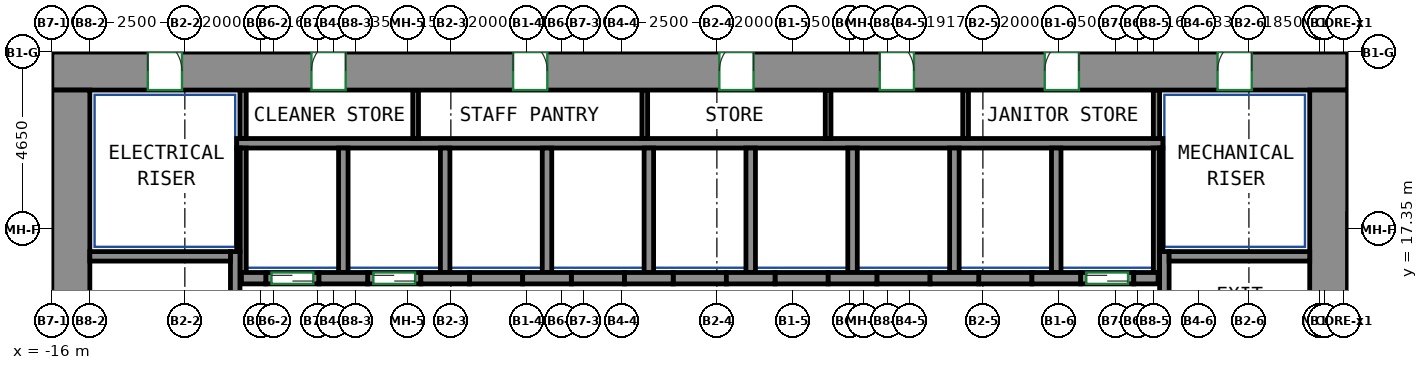
"""IFC4 building model, lengths in metres.
Left out: names, types, materials, properties, quantities, classifications, styles, units other than length and angle.
Written with IfcOpenShell. Run it as: python <this file> out.ifc"""

import sys

from ifc_helpers import new_model, si_unit, direction, frame, frame_2d, origin, place, context, subcontext, project, spatial, rectangle, extrude, source, transform, mapped, element, fill, save


model = new_model("IFC4")
c1 = context("Model", 3, precision=1e-05, world=origin(), true_north=direction((0.0, 1.0)))
c2 = subcontext(c1, "Body", "Model", "MODEL_VIEW")
j1 = project(units=[si_unit("LENGTHUNIT", "METRE"), si_unit("PLANEANGLEUNIT", "RADIAN")], contexts=[c1])
p1 = place(None, origin())
s1 = spatial("IfcSite", under=j1, at=p1, CompositionType="ELEMENT")
p2 = place(p1, origin())
s2 = spatial("IfcBuilding", under=s1, at=p2, CompositionType="ELEMENT")
p3 = place(p2, frame((0.0, 0.0, 83.2)))
s3 = spatial("IfcBuildingStorey", under=s2, at=p3, CompositionType="ELEMENT", Elevation=83.2)
m1 = source(origin(), c2, "Body", "SweptSolid", [
    extrude(rectangle(XDim=34.1, YDim=1.0, at=frame_2d((17.05, 0.0))), origin(), (0.0, 0.0, 1.0), 3.72),
])
p4 = place(p3, frame((-16.0, 21.5, 0.0), z_axis=(0.0, 0.0, 1.0), x_axis=(1.0, 0.0, 0.0)))
e1 = element("IfcWall", 1, at=p4, inside=s3, PredefinedType="SHEAR", context=c2, shape_type="MappedRepresentation", body=[
    mapped(m1, transform((0.0, 0.0, 0.0))),
])
p5 = place(p4, frame((6.831, 0.0, 0.0)))
e2 = element("IfcOpeningElement", 2, at=p5, cuts=e1, PredefinedType="OPENING", context=c2, shape_type="SweptSolid", body=[
    extrude(rectangle(XDim=0.9, YDim=2.1, at=frame_2d((0.45, 1.05))), frame((0.0, 0.51, 0.0), z_axis=(0.0, -1.0, 0.0), x_axis=(1.0, 0.0, 0.0)), (0.0, 0.0, 1.0), 1.02),
])
p6 = place(p4, frame((12.138, 0.0, 0.0)))
e3 = element("IfcOpeningElement", 3, at=p6, cuts=e1, PredefinedType="OPENING", context=c2, shape_type="SweptSolid", body=[
    extrude(rectangle(XDim=0.9, YDim=2.1, at=frame_2d((0.45, 1.05))), frame((0.0, 0.51, 0.0), z_axis=(0.0, -1.0, 0.0), x_axis=(1.0, 0.0, 0.0)), (0.0, 0.0, 1.0), 1.02),
])
p7 = place(p4, frame((17.565, 0.0, 0.0)))
e4 = element("IfcOpeningElement", 4, at=p7, cuts=e1, PredefinedType="OPENING", context=c2, shape_type="SweptSolid", body=[
    extrude(rectangle(XDim=0.9, YDim=2.1, at=frame_2d((0.45, 1.05))), frame((0.0, 0.51, 0.0), z_axis=(0.0, -1.0, 0.0), x_axis=(1.0, 0.0, 0.0)), (0.0, 0.0, 1.0), 1.02),
])
p8 = place(p4, frame((21.786, 0.0, 0.0)))
e5 = element("IfcOpeningElement", 5, at=p8, cuts=e1, PredefinedType="OPENING", context=c2, shape_type="SweptSolid", body=[
    extrude(rectangle(XDim=0.9, YDim=2.1, at=frame_2d((0.45, 1.05))), frame((0.0, 0.51, 0.0), z_axis=(0.0, -1.0, 0.0), x_axis=(1.0, 0.0, 0.0)), (0.0, 0.0, 1.0), 1.02),
])
p9 = place(p4, frame((26.127, 0.0, 0.0)))
e6 = element("IfcOpeningElement", 6, at=p9, cuts=e1, PredefinedType="OPENING", context=c2, shape_type="SweptSolid", body=[
    extrude(rectangle(XDim=0.9, YDim=2.1, at=frame_2d((0.45, 1.05))), frame((0.0, 0.51, 0.0), z_axis=(0.0, -1.0, 0.0), x_axis=(1.0, 0.0, 0.0)), (0.0, 0.0, 1.0), 1.02),
])
p10 = place(p4, frame((2.525, 0.0, 0.0)))
e7 = element("IfcOpeningElement", 7, at=p10, cuts=e1, PredefinedType="OPENING", context=c2, shape_type="SweptSolid", body=[
    extrude(rectangle(XDim=0.9, YDim=2.1, at=frame_2d((0.45, 1.05))), frame((0.0, 0.51, 0.0), z_axis=(0.0, -1.0, 0.0), x_axis=(1.0, 0.0, 0.0)), (0.0, 0.0, 1.0), 1.02),
])
p11 = place(p4, frame((30.675, 0.0, 0.0)))
e8 = element("IfcOpeningElement", 8, at=p11, cuts=e1, PredefinedType="OPENING", context=c2, shape_type="SweptSolid", body=[
    extrude(rectangle(XDim=0.9, YDim=2.1, at=frame_2d((0.45, 1.05))), frame((0.0, 0.51, 0.0), z_axis=(0.0, -1.0, 0.0), x_axis=(1.0, 0.0, 0.0)), (0.0, 0.0, 1.0), 1.02),
])
m2 = source(origin(), c2, "Body", "SweptSolid", [
    extrude(rectangle(XDim=12.0, YDim=1.0, at=frame_2d((6.0, 0.0))), origin(), (0.0, 0.0, 1.0), 3.72),
])
for number, where, z_axis, x_axis in (
    (9, (-15.5, 9.0, 0.0), (0.0, 0.0, 1.0), (0.0, 1.0, 0.0)),
    (10, (17.6, 9.0, 0.0), (0.0, 0.0, 1.0), (0.0, 1.0, 0.0)),
):
    element("IfcWall", number, at=place(p3, frame(where, z_axis=z_axis, x_axis=x_axis)), inside=s3, PredefinedType="SHEAR", context=c2, shape_type="MappedRepresentation", body=[
        mapped(m2, transform((0.0, 0.0, 0.0))),
    ])
m3 = source(origin(), c2, "Body", "SweptSolid", [
    extrude(rectangle(XDim=7.75, YDim=0.25, at=frame_2d((3.875, 0.0))), origin(), (0.0, 0.0, 1.0), 3.72),
])
p12 = place(p3, frame((-11.175, 9.0, 0.0), z_axis=(0.0, 0.0, 1.0), x_axis=(0.0, 1.0, 0.0)))
e11 = element("IfcWall", 11, at=p12, inside=s3, PredefinedType="SHEAR", context=c2, shape_type="MappedRepresentation", body=[
    mapped(m3, transform((0.0, 0.0, 0.0))),
])
m4 = source(origin(), c2, "Body", "SweptSolid", [
    extrude(rectangle(XDim=3.7, YDim=0.25, at=frame_2d((1.85, 0.0))), origin(), (0.0, 0.0, 1.0), 3.72),
])
p13 = place(p3, frame((-15.0, 16.625, 0.0), z_axis=(0.0, 0.0, 1.0), x_axis=(1.0, 0.0, 0.0)))
e12 = element("IfcWall", 12, at=p13, inside=s3, PredefinedType="SHEAR", context=c2, shape_type="MappedRepresentation", body=[
    mapped(m4, transform((0.0, 0.0, 0.0))),
])
p14 = place(p3, frame((13.275, 9.0, 0.0), z_axis=(0.0, 0.0, 1.0), x_axis=(0.0, 1.0, 0.0)))
e13 = element("IfcWall", 13, at=p14, inside=s3, PredefinedType="SHEAR", context=c2, shape_type="MappedRepresentation", body=[
    mapped(m3, transform((0.0, 0.0, 0.0))),
])
m5 = source(origin(), c2, "Body", "SweptSolid", [
    extrude(rectangle(XDim=3.7, YDim=0.25, at=frame_2d((1.85, 0.0))), origin(), (0.0, 0.0, 1.0), 3.72),
])
p15 = place(p3, frame((13.4, 16.625, 0.0), z_axis=(0.0, 0.0, 1.0), x_axis=(1.0, 0.0, 0.0)))
e14 = element("IfcWall", 14, at=p15, inside=s3, PredefinedType="SHEAR", context=c2, shape_type="MappedRepresentation", body=[
    mapped(m5, transform((0.0, 0.0, 0.0))),
])
m6 = source(origin(), c2, "Body", "SweptSolid", [
    extrude(rectangle(XDim=0.64, YDim=0.3, at=frame_2d((0.32, 0.0))), origin(), (0.0, 0.0, 1.0), 3.72),
])
p16 = place(p3, frame((-11.01, 16.05, 0.0), z_axis=(0.0, 0.0, 1.0), x_axis=(1.0, 0.0, 0.0)))
e15 = element("IfcWall", 15, at=p16, inside=s3, PredefinedType="SHEAR", context=c2, shape_type="MappedRepresentation", body=[
    mapped(m6, transform((0.0, 0.0, 0.0))),
])
m7 = source(origin(), c2, "Body", "SweptSolid", [
    extrude(rectangle(XDim=1.28, YDim=0.3, at=frame_2d((0.64, 0.0))), origin(), (0.0, 0.0, 1.0), 3.72),
])
for number, where, z_axis, x_axis in (
    (16, (-8.97, 16.05, 0.0), (0.0, 0.0, 1.0), (1.0, 0.0, 0.0)),
    (17, (-6.29, 16.05, 0.0), (0.0, 0.0, 1.0), (1.0, 0.0, 0.0)),
    (18, (-3.61, 16.05, 0.0), (0.0, 0.0, 1.0), (1.0, 0.0, 0.0)),
    (19, (-0.93, 16.05, 0.0), (0.0, 0.0, 1.0), (1.0, 0.0, 0.0)),
    (20, (1.75, 16.05, 0.0), (0.0, 0.0, 1.0), (1.0, 0.0, 0.0)),
    (21, (4.43, 16.05, 0.0), (0.0, 0.0, 1.0), (1.0, 0.0, 0.0)),
):
    element("IfcWall", number, at=place(p3, frame(where, z_axis=z_axis, x_axis=x_axis)), inside=s3, PredefinedType="SHEAR", context=c2, shape_type="MappedRepresentation", body=[
        mapped(m7, transform((0.0, 0.0, 0.0))),
    ])
m8 = source(origin(), c2, "Body", "SweptSolid", [
    extrude(rectangle(XDim=1.28, YDim=0.3, at=frame_2d((0.64, 0.0))), origin(), (0.0, 0.0, 1.0), 3.72),
])
p17 = place(p3, frame((7.11, 16.05, 0.0), z_axis=(0.0, 0.0, 1.0), x_axis=(1.0, 0.0, 0.0)))
e22 = element("IfcWall", 22, at=p17, inside=s3, PredefinedType="SHEAR", context=c2, shape_type="MappedRepresentation", body=[
    mapped(m8, transform((0.0, 0.0, 0.0))),
])
p18 = place(p3, frame((9.79, 16.05, 0.0), z_axis=(0.0, 0.0, 1.0), x_axis=(1.0, 0.0, 0.0)))
e23 = element("IfcWall", 23, at=p18, inside=s3, PredefinedType="SHEAR", context=c2, shape_type="MappedRepresentation", body=[
    mapped(m7, transform((0.0, 0.0, 0.0))),
])
m9 = source(origin(), c2, "Body", "SweptSolid", [
    extrude(rectangle(XDim=0.64, YDim=0.3, at=frame_2d((0.32, 0.0))), origin(), (0.0, 0.0, 1.0), 3.72),
])
p19 = place(p3, frame((12.47, 16.05, 0.0), z_axis=(0.0, 0.0, 1.0), x_axis=(1.0, 0.0, 0.0)))
e24 = element("IfcWall", 24, at=p19, inside=s3, PredefinedType="SHEAR", context=c2, shape_type="MappedRepresentation", body=[
    mapped(m9, transform((0.0, 0.0, 0.0))),
])
m10 = source(origin(), c2, "Body", "SweptSolid", [
    extrude(rectangle(XDim=1.4, YDim=0.3, at=frame_2d((0.7, 0.0))), origin(), (0.0, 0.0, 1.0), 3.72),
])
p20 = place(p3, frame((11.07, 16.05, 0.0), z_axis=(0.0, 0.0, 1.0), x_axis=(1.0, 0.0, 0.0)))
e25 = element("IfcWall", 25, at=p20, inside=s3, PredefinedType="PARTITIONING", context=c2, shape_type="MappedRepresentation", body=[
    mapped(m10, transform((0.0, 0.0, 0.0))),
])
p21 = place(p20, frame((0.15, 0.0, 0.0)))
e26 = element("IfcOpeningElement", 26, at=p21, cuts=e25, PredefinedType="OPENING", context=c2, shape_type="SweptSolid", body=[
    extrude(rectangle(XDim=1.1, YDim=2.1, at=frame_2d((0.55, 1.05))), frame((0.0, 0.16, 0.0), z_axis=(0.0, -1.0, 0.0), x_axis=(1.0, 0.0, 0.0)), (0.0, 0.0, 1.0), 0.32),
])
m11 = source(origin(), c2, "Body", "SweptSolid", [
    extrude(rectangle(XDim=1.4, YDim=0.3, at=frame_2d((0.7, 0.0))), origin(), (0.0, 0.0, 1.0), 3.72),
])
p22 = place(p3, frame((-10.37, 16.05, 0.0), z_axis=(0.0, 0.0, 1.0), x_axis=(1.0, 0.0, 0.0)))
e27 = element("IfcWall", 27, at=p22, inside=s3, PredefinedType="PARTITIONING", context=c2, shape_type="MappedRepresentation", body=[
    mapped(m11, transform((0.0, 0.0, 0.0))),
])
p23 = place(p22, frame((0.15, 0.0, 0.0)))
e28 = element("IfcOpeningElement", 28, at=p23, cuts=e27, PredefinedType="OPENING", context=c2, shape_type="SweptSolid", body=[
    extrude(rectangle(XDim=1.1, YDim=2.1, at=frame_2d((0.55, 1.05))), frame((0.0, 0.16, 0.0), z_axis=(0.0, -1.0, 0.0), x_axis=(1.0, 0.0, 0.0)), (0.0, 0.0, 1.0), 0.32),
])
p24 = place(p3, frame((-7.69, 16.05, 0.0), z_axis=(0.0, 0.0, 1.0), x_axis=(1.0, 0.0, 0.0)))
e29 = element("IfcWall", 29, at=p24, inside=s3, PredefinedType="PARTITIONING", context=c2, shape_type="MappedRepresentation", body=[
    mapped(m10, transform((0.0, 0.0, 0.0))),
])
p25 = place(p24, frame((0.15, 0.0, 0.0)))
e30 = element("IfcOpeningElement", 30, at=p25, cuts=e29, PredefinedType="OPENING", context=c2, shape_type="SweptSolid", body=[
    extrude(rectangle(XDim=1.1, YDim=2.1, at=frame_2d((0.55, 1.05))), frame((0.0, 0.16, 0.0), z_axis=(0.0, -1.0, 0.0), x_axis=(1.0, 0.0, 0.0)), (0.0, 0.0, 1.0), 0.32),
])
p26 = place(p3, frame((-5.01, 16.05, 0.0), z_axis=(0.0, 0.0, 1.0), x_axis=(1.0, 0.0, 0.0)))
e31 = element("IfcWall", 31, at=p26, inside=s3, PredefinedType="PARTITIONING", context=c2, shape_type="MappedRepresentation", body=[
    mapped(m10, transform((0.0, 0.0, 0.0))),
])
p27 = place(p3, frame((-2.33, 16.05, 0.0), z_axis=(0.0, 0.0, 1.0), x_axis=(1.0, 0.0, 0.0)))
e32 = element("IfcWall", 32, at=p27, inside=s3, PredefinedType="PARTITIONING", context=c2, shape_type="MappedRepresentation", body=[
    mapped(m11, transform((0.0, 0.0, 0.0))),
])
for number, where, z_axis, x_axis in (
    (33, (0.35, 16.05, 0.0), (0.0, 0.0, 1.0), (1.0, 0.0, 0.0)),
    (34, (3.03, 16.05, 0.0), (0.0, 0.0, 1.0), (1.0, 0.0, 0.0)),
):
    element("IfcWall", number, at=place(p3, frame(where, z_axis=z_axis, x_axis=x_axis)), inside=s3, PredefinedType="PARTITIONING", context=c2, shape_type="MappedRepresentation", body=[
        mapped(m10, transform((0.0, 0.0, 0.0))),
    ])
for number, where, z_axis, x_axis in (
    (35, (5.71, 16.05, 0.0), (0.0, 0.0, 1.0), (1.0, 0.0, 0.0)),
    (36, (8.39, 16.05, 0.0), (0.0, 0.0, 1.0), (1.0, 0.0, 0.0)),
):
    element("IfcWall", number, at=place(p3, frame(where, z_axis=z_axis, x_axis=x_axis)), inside=s3, PredefinedType="PARTITIONING", context=c2, shape_type="MappedRepresentation", body=[
        mapped(m11, transform((0.0, 0.0, 0.0))),
    ])
m12 = source(origin(), c2, "Body", "SweptSolid", [
    extrude(rectangle(XDim=24.37, YDim=0.25, at=frame_2d((12.185, 0.0))), origin(), (0.0, 0.0, 1.0), 3.72),
])
p28 = place(p3, frame((-11.135, 19.6, 0.0), z_axis=(0.0, 0.0, 1.0), x_axis=(1.0, 0.0, 0.0)))
e37 = element("IfcWall", 37, at=p28, inside=s3, PredefinedType="PARTITIONING", context=c2, shape_type="MappedRepresentation", body=[
    mapped(m12, transform((0.0, 0.0, 0.0))),
])
m13 = source(origin(), c2, "Body", "SweptSolid", [
    extrude(rectangle(XDim=3.275, YDim=0.165, at=frame_2d((1.638, 0.0))), origin(), (0.0, 0.0, 1.0), 3.72),
])
p29 = place(p3, frame((13.067, 16.2, 0.0), z_axis=(0.0, 0.0, 1.0), x_axis=(0.0, 1.0, 0.0)))
e38 = element("IfcWall", 38, at=p29, inside=s3, PredefinedType="PARTITIONING", context=c2, shape_type="MappedRepresentation", body=[
    mapped(m13, transform((0.0, 0.0, 0.0))),
])
m14 = source(origin(), c2, "Body", "SweptSolid", [
    extrude(rectangle(XDim=1.275, YDim=0.165, at=frame_2d((0.637, 0.0))), origin(), (0.0, 0.0, 1.0), 3.72),
])
p30 = place(p3, frame((13.067, 19.725, 0.0), z_axis=(0.0, 0.0, 1.0), x_axis=(0.0, 1.0, 0.0)))
e39 = element("IfcWall", 39, at=p30, inside=s3, PredefinedType="PARTITIONING", context=c2, shape_type="MappedRepresentation", body=[
    mapped(m14, transform((0.0, 0.0, 0.0))),
])
p31 = place(p3, frame((-10.968, 16.2, 0.0), z_axis=(0.0, 0.0, 1.0), x_axis=(0.0, 1.0, 0.0)))
e40 = element("IfcWall", 40, at=p31, inside=s3, PredefinedType="PARTITIONING", context=c2, shape_type="MappedRepresentation", body=[
    mapped(m13, transform((0.0, 0.0, 0.0))),
])
p32 = place(p3, frame((-10.968, 19.725, 0.0), z_axis=(0.0, 0.0, 1.0), x_axis=(0.0, 1.0, 0.0)))
e41 = element("IfcWall", 41, at=p32, inside=s3, PredefinedType="PARTITIONING", context=c2, shape_type="MappedRepresentation", body=[
    mapped(m14, transform((0.0, 0.0, 0.0))),
])
m15 = source(origin(), c2, "Body", "SweptSolid", [
    extrude(rectangle(XDim=3.275, YDim=0.25, at=frame_2d((1.638, 0.0))), origin(), (0.0, 0.0, 1.0), 3.72),
])
p33 = place(p3, frame((10.43, 16.2, 0.0), z_axis=(0.0, 0.0, 1.0), x_axis=(0.0, 1.0, 0.0)))
e42 = element("IfcWall", 42, at=p33, inside=s3, PredefinedType="PARTITIONING", context=c2, shape_type="MappedRepresentation", body=[
    mapped(m15, transform((0.0, 0.0, 0.0))),
])
m16 = source(origin(), c2, "Body", "SweptSolid", [
    extrude(rectangle(XDim=2.725, YDim=0.085, at=frame_2d((1.363, 0.0))), origin(), (0.0, 0.0, 1.0), 3.72),
])
p34 = place(p3, frame((13.192, 16.75, 0.0), z_axis=(0.0, 0.0, 1.0), x_axis=(0.0, 1.0, 0.0)))
e43 = element("IfcWall", 43, at=p34, inside=s3, PredefinedType="PARTITIONING", context=c2, shape_type="MappedRepresentation", body=[
    mapped(m16, transform((0.0, 0.0, 0.0))),
])
for number, where, z_axis, x_axis in (
    (44, (2.39, 16.2, 0.0), (0.0, 0.0, 1.0), (0.0, 1.0, 0.0)),
    (45, (5.07, 16.2, 0.0), (0.0, 0.0, 1.0), (0.0, 1.0, 0.0)),
    (46, (7.75, 16.2, 0.0), (0.0, 0.0, 1.0), (0.0, 1.0, 0.0)),
    (47, (-0.29, 16.2, 0.0), (0.0, 0.0, 1.0), (0.0, 1.0, 0.0)),
):
    element("IfcWall", number, at=place(p3, frame(where, z_axis=z_axis, x_axis=x_axis)), inside=s3, PredefinedType="PARTITIONING", context=c2, shape_type="MappedRepresentation", body=[
        mapped(m15, transform((0.0, 0.0, 0.0))),
    ])
p35 = place(p3, frame((-11.093, 16.75, 0.0), z_axis=(0.0, 0.0, 1.0), x_axis=(0.0, 1.0, 0.0)))
e48 = element("IfcWall", 48, at=p35, inside=s3, PredefinedType="PARTITIONING", context=c2, shape_type="MappedRepresentation", body=[
    mapped(m16, transform((0.0, 0.0, 0.0))),
])
for number, where, z_axis, x_axis in (
    (49, (-2.97, 16.2, 0.0), (0.0, 0.0, 1.0), (0.0, 1.0, 0.0)),
    (50, (-5.65, 16.2, 0.0), (0.0, 0.0, 1.0), (0.0, 1.0, 0.0)),
    (51, (-8.33, 16.2, 0.0), (0.0, 0.0, 1.0), (0.0, 1.0, 0.0)),
):
    element("IfcWall", number, at=place(p3, frame(where, z_axis=z_axis, x_axis=x_axis)), inside=s3, PredefinedType="PARTITIONING", context=c2, shape_type="MappedRepresentation", body=[
        mapped(m15, transform((0.0, 0.0, 0.0))),
    ])
m17 = source(origin(), c2, "Body", "SweptSolid", [
    extrude(rectangle(XDim=1.275, YDim=0.15, at=frame_2d((0.637, 0.0))), origin(), (0.0, 0.0, 1.0), 3.72),
])
for number, where, z_axis, x_axis in (
    (52, (-6.427, 19.725, 0.0), (0.0, 0.0, 1.0), (0.0, 1.0, 0.0)),
    (53, (-0.397, 19.725, 0.0), (0.0, 0.0, 1.0), (0.0, 1.0, 0.0)),
    (54, (4.427, 19.725, 0.0), (0.0, 0.0, 1.0), (0.0, 1.0, 0.0)),
    (55, (8.045, 19.725, 0.0), (0.0, 0.0, 1.0), (0.0, 1.0, 0.0)),
):
    element("IfcWall", number, at=place(p3, frame(where, z_axis=z_axis, x_axis=x_axis)), inside=s3, PredefinedType="PARTITIONING", context=c2, shape_type="MappedRepresentation", body=[
        mapped(m17, transform((0.0, 0.0, 0.0))),
    ])
p36 = place(p21, origin())
e56 = element("IfcDoor", 56, at=p36, inside=s3, OperationType="DOUBLE_DOOR_SLIDING", PredefinedType="DOOR", context=c2, shape_type="SweptSolid", body=[
    extrude(rectangle(XDim=1.1, YDim=2.1, at=frame_2d((0.55, 1.05))), frame((0.0, 0.025, 0.0), z_axis=(0.0, -1.0, 0.0), x_axis=(1.0, 0.0, 0.0)), (0.0, 0.0, 1.0), 0.05),
])
fill(e26, e56)
p37 = place(p23, origin())
e57 = element("IfcDoor", 57, at=p37, inside=s3, OperationType="DOUBLE_DOOR_SLIDING", PredefinedType="DOOR", context=c2, shape_type="SweptSolid", body=[
    extrude(rectangle(XDim=1.1, YDim=2.1, at=frame_2d((0.55, 1.05))), frame((0.0, 0.025, 0.0), z_axis=(0.0, -1.0, 0.0), x_axis=(1.0, 0.0, 0.0)), (0.0, 0.0, 1.0), 0.05),
])
fill(e28, e57)
p38 = place(p25, origin())
e58 = element("IfcDoor", 58, at=p38, inside=s3, OperationType="DOUBLE_DOOR_SLIDING", PredefinedType="DOOR", context=c2, shape_type="SweptSolid", body=[
    extrude(rectangle(XDim=1.1, YDim=2.1, at=frame_2d((0.55, 1.05))), frame((0.0, 0.025, 0.0), z_axis=(0.0, -1.0, 0.0), x_axis=(1.0, 0.0, 0.0)), (0.0, 0.0, 1.0), 0.05),
])
fill(e30, e58)
p39 = place(p5, origin())
e59 = element("IfcDoor", 59, at=p39, inside=s3, OperationType="SINGLE_SWING_RIGHT", PredefinedType="DOOR", context=c2, shape_type="SweptSolid", body=[
    extrude(rectangle(XDim=0.9, YDim=2.1, at=frame_2d((0.45, 1.05))), frame((0.0, -0.355, 0.0), z_axis=(0.0, -1.0, 0.0), x_axis=(1.0, 0.0, 0.0)), (0.0, 0.0, 1.0), 0.05),
])
fill(e2, e59)
p40 = place(p6, origin())
e60 = element("IfcDoor", 60, at=p40, inside=s3, OperationType="SINGLE_SWING_LEFT", PredefinedType="DOOR", context=c2, shape_type="SweptSolid", body=[
    extrude(rectangle(XDim=0.9, YDim=2.1, at=frame_2d((0.45, 1.05))), frame((0.0, -0.355, 0.0), z_axis=(0.0, -1.0, 0.0), x_axis=(1.0, 0.0, 0.0)), (0.0, 0.0, 1.0), 0.05),
])
fill(e3, e60)
p41 = place(p7, origin())
e61 = element("IfcDoor", 61, at=p41, inside=s3, OperationType="SINGLE_SWING_RIGHT", PredefinedType="DOOR", context=c2, shape_type="SweptSolid", body=[
    extrude(rectangle(XDim=0.9, YDim=2.1, at=frame_2d((0.45, 1.05))), frame((0.0, -0.355, 0.0), z_axis=(0.0, -1.0, 0.0), x_axis=(1.0, 0.0, 0.0)), (0.0, 0.0, 1.0), 0.05),
])
fill(e4, e61)
p42 = place(p8, origin())
e62 = element("IfcDoor", 62, at=p42, inside=s3, OperationType="SINGLE_SWING_LEFT", PredefinedType="DOOR", context=c2, shape_type="SweptSolid", body=[
    extrude(rectangle(XDim=0.9, YDim=2.1, at=frame_2d((0.45, 1.05))), frame((0.0, -0.355, 0.0), z_axis=(0.0, -1.0, 0.0), x_axis=(1.0, 0.0, 0.0)), (0.0, 0.0, 1.0), 0.05),
])
fill(e5, e62)
p43 = place(p9, origin())
e63 = element("IfcDoor", 63, at=p43, inside=s3, OperationType="SINGLE_SWING_RIGHT", PredefinedType="DOOR", context=c2, shape_type="SweptSolid", body=[
    extrude(rectangle(XDim=0.9, YDim=2.1, at=frame_2d((0.45, 1.05))), frame((0.0, -0.355, 0.0), z_axis=(0.0, -1.0, 0.0), x_axis=(1.0, 0.0, 0.0)), (0.0, 0.0, 1.0), 0.05),
])
fill(e6, e63)
p44 = place(p10, origin())
e64 = element("IfcDoor", 64, at=p44, inside=s3, OperationType="SINGLE_SWING_LEFT", PredefinedType="DOOR", context=c2, shape_type="SweptSolid", body=[
    extrude(rectangle(XDim=0.9, YDim=2.1, at=frame_2d((0.45, 1.05))), frame((0.0, -0.355, 0.0), z_axis=(0.0, -1.0, 0.0), x_axis=(1.0, 0.0, 0.0)), (0.0, 0.0, 1.0), 0.05),
])
fill(e7, e64)
p45 = place(p11, origin())
e65 = element("IfcDoor", 65, at=p45, inside=s3, OperationType="SINGLE_SWING_RIGHT", PredefinedType="DOOR", context=c2, shape_type="SweptSolid", body=[
    extrude(rectangle(XDim=0.9, YDim=2.1, at=frame_2d((0.45, 1.05))), frame((0.0, -0.355, 0.0), z_axis=(0.0, -1.0, 0.0), x_axis=(1.0, 0.0, 0.0)), (0.0, 0.0, 1.0), 0.05),
])
fill(e8, e65)
save(model, sys.argv[1])
